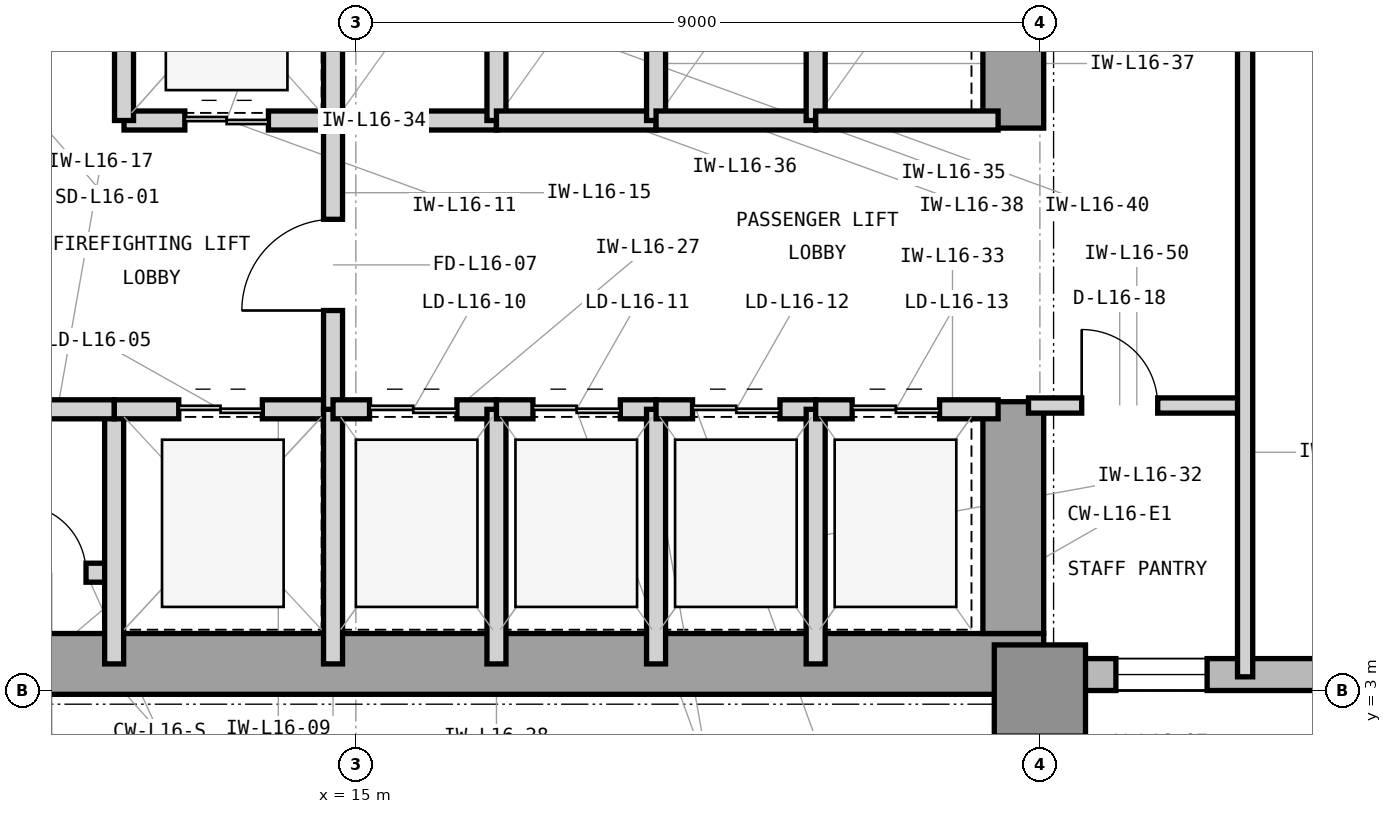
"""IFC4 building model, lengths in metres.
Left out: names, types, materials, properties, quantities, classifications, styles, units other than length and angle.
Written with IfcOpenShell. Run it as: python <this file> out.ifc"""

import sys

from ifc_helpers import new_model, si_unit, direction, frame, frame_2d, origin, origin_2d, place, context, subcontext, project, spatial, rectangle, extrude, element, fill, save


model = new_model("IFC4")
c1 = context("Model", 3, precision=1e-05, world=origin(), true_north=direction((0.0, 1.0)))
c2 = subcontext(c1, "Body", "Model", "MODEL_VIEW")
j1 = project(units=[si_unit("LENGTHUNIT", "METRE"), si_unit("PLANEANGLEUNIT", "RADIAN")], contexts=[c1])
p1 = place(None, origin())
s1 = spatial("IfcSite", under=j1, at=p1, CompositionType="ELEMENT")
p2 = place(p1, origin())
s2 = spatial("IfcBuilding", under=s1, at=p2, CompositionType="ELEMENT")
p3 = place(p2, frame((0.0, 0.0, 72.0)))
s3 = spatial("IfcBuildingStorey", under=s2, at=p3, CompositionType="ELEMENT", Elevation=72.0)
p4 = place(p3, frame((7.475, 3.35, 0.0), z_axis=(0.0, 0.0, 1.0), x_axis=(1.0, 0.0, 0.0)))
e1 = element("IfcWall", 1, at=p4, inside=s3, PredefinedType="SHEAR", context=c2, shape_type="SweptSolid", body=[
    extrude(rectangle(XDim=16.575, YDim=0.8, at=frame_2d((8.288, 0.0))), origin(), (0.0, 0.0, 1.0), 4.2),
])
p5 = place(p3, frame((23.65, 3.75, 0.0), z_axis=(0.0, 0.0, 1.0), x_axis=(0.0, 1.0, 0.0)))
e2 = element("IfcWall", 2, at=p5, inside=s3, PredefinedType="SHEAR", context=c2, shape_type="SweptSolid", body=[
    extrude(rectangle(XDim=3.05, YDim=0.8, at=frame_2d((1.525, 0.0))), origin(), (0.0, 0.0, 1.0), 4.2),
])
p6 = place(p3, frame((23.65, 10.4, 0.0), z_axis=(0.0, 0.0, 1.0), x_axis=(0.0, 1.0, 0.0)))
e3 = element("IfcWall", 3, at=p6, inside=s3, PredefinedType="SHEAR", context=c2, shape_type="SweptSolid", body=[
    extrude(rectangle(XDim=3.2, YDim=0.8, at=frame_2d((1.6, 0.0))), origin(), (0.0, 0.0, 1.0), 4.2),
])
p7 = place(p3, frame((24.0, 3.0, 0.0), z_axis=(0.0, 0.0, 1.0), x_axis=(1.0, 0.0, 0.0)))
e4 = element("IfcColumn", 4, at=p7, inside=s3, PredefinedType="COLUMN", context=c2, shape_type="SweptSolid", body=[
    extrude(rectangle(XDim=1.2, YDim=1.2, at=origin_2d()), origin(), (0.0, 0.0, 1.0), 4.2),
])
p8 = place(p3, frame((23.9, 3.21, 0.0), z_axis=(0.0, 0.0, 1.0), x_axis=(1.0, 0.0, 0.0)))
e5 = element("IfcWall", 5, at=p8, inside=s3, PredefinedType="STANDARD", context=c2, shape_type="SweptSolid", body=[
    extrude(rectangle(XDim=40.5, YDim=0.42, at=frame_2d((20.25, 0.0))), origin(), (0.0, 0.0, 1.0), 3.98),
])
p9 = place(p8, frame((1.1, 0.0, 0.85)))
e6 = element("IfcOpeningElement", 6, at=p9, cuts=e5, PredefinedType="OPENING", context=c2, shape_type="SweptSolid", body=[
    extrude(rectangle(XDim=1.2, YDim=2.45, at=frame_2d((0.6, 1.225))), frame((0.0, 0.22, 0.0), z_axis=(0.0, -1.0, 0.0), x_axis=(1.0, 0.0, 0.0)), (0.0, 0.0, 1.0), 0.44),
])
p10 = place(p8, frame((5.136, 0.0, 0.85)))
e7 = element("IfcOpeningElement", 7, at=p10, cuts=e5, PredefinedType="OPENING", context=c2, shape_type="SweptSolid", body=[
    extrude(rectangle(XDim=2.8, YDim=2.45, at=frame_2d((1.4, 1.225))), frame((0.0, 0.22, 0.0), z_axis=(0.0, -1.0, 0.0), x_axis=(1.0, 0.0, 0.0)), (0.0, 0.0, 1.0), 0.44),
])
p11 = place(p8, frame((12.636, 0.0, 0.85)))
e8 = element("IfcOpeningElement", 8, at=p11, cuts=e5, PredefinedType="OPENING", context=c2, shape_type="SweptSolid", body=[
    extrude(rectangle(XDim=2.8, YDim=2.45, at=frame_2d((1.4, 1.225))), frame((0.0, 0.22, 0.0), z_axis=(0.0, -1.0, 0.0), x_axis=(1.0, 0.0, 0.0)), (0.0, 0.0, 1.0), 0.44),
])
p12 = place(p8, frame((20.336, 0.0, 0.85)))
e9 = element("IfcOpeningElement", 9, at=p12, cuts=e5, PredefinedType="OPENING", context=c2, shape_type="SweptSolid", body=[
    extrude(rectangle(XDim=2.8, YDim=2.45, at=frame_2d((1.4, 1.225))), frame((0.0, 0.22, 0.0), z_axis=(0.0, -1.0, 0.0), x_axis=(1.0, 0.0, 0.0)), (0.0, 0.0, 1.0), 0.44),
])
p13 = place(p8, frame((30.886, 0.0, 0.85)))
e10 = element("IfcOpeningElement", 10, at=p13, cuts=e5, PredefinedType="OPENING", context=c2, shape_type="SweptSolid", body=[
    extrude(rectangle(XDim=1.2, YDim=2.45, at=frame_2d((0.6, 1.225))), frame((0.0, 0.22, 0.0), z_axis=(0.0, -1.0, 0.0), x_axis=(1.0, 0.0, 0.0)), (0.0, 0.0, 1.0), 0.44),
])
p14 = place(p3, frame((10.33, 4.55, 0.0), z_axis=(0.0, 0.0, 1.0), x_axis=(1.0, 0.0, 0.0)))
e11 = element("IfcWall", 11, at=p14, inside=s3, PredefinedType="PARTITIONING", context=c2, shape_type="SweptSolid", body=[
    extrude(rectangle(XDim=1.49, YDim=0.25, at=frame_2d((0.745, 0.0))), origin(), (0.0, 0.0, 1.0), 3.97),
])
p15 = place(p14, frame((0.22, 0.0, 0.0)))
e12 = element("IfcOpeningElement", 12, at=p15, cuts=e11, PredefinedType="OPENING", context=c2, shape_type="SweptSolid", body=[
    extrude(rectangle(XDim=0.9, YDim=2.1, at=frame_2d((0.45, 1.05))), frame((0.0, 0.135, 0.0), z_axis=(0.0, -1.0, 0.0), x_axis=(1.0, 0.0, 0.0)), (0.0, 0.0, 1.0), 0.27),
])
p16 = place(p3, frame((11.82, 3.35, 0.0), z_axis=(0.0, 0.0, 1.0), x_axis=(0.0, 1.0, 0.0)))
e13 = element("IfcWall", 13, at=p16, inside=s3, PredefinedType="PARTITIONING", context=c2, shape_type="SweptSolid", body=[
    extrude(rectangle(XDim=3.35, YDim=0.25, at=frame_2d((1.675, 0.0))), origin(), (0.0, 0.0, 1.0), 3.97),
])
p17 = place(p3, frame((11.82, 6.7, 0.0), z_axis=(0.0, 0.0, 1.0), x_axis=(1.0, 0.0, 0.0)))
e14 = element("IfcWall", 14, at=p17, inside=s3, PredefinedType="PARTITIONING", context=c2, shape_type="SweptSolid", body=[
    extrude(rectangle(XDim=2.88, YDim=0.25, at=frame_2d((1.44, 0.0))), origin(), (0.0, 0.0, 1.0), 3.426),
])
p18 = place(p17, frame((0.85, 0.0, 0.0)))
e15 = element("IfcOpeningElement", 15, at=p18, cuts=e14, PredefinedType="OPENING", context=c2, shape_type="SweptSolid", body=[
    extrude(rectangle(XDim=1.1, YDim=2.25, at=frame_2d((0.55, 1.125))), frame((0.0, 0.135, 0.0), z_axis=(0.0, -1.0, 0.0), x_axis=(1.0, 0.0, 0.0)), (0.0, 0.0, 1.0), 0.27),
])
p19 = place(p3, frame((14.7, 3.35, 0.0), z_axis=(0.0, 0.0, 1.0), x_axis=(0.0, 1.0, 0.0)))
e16 = element("IfcWall", 16, at=p19, inside=s3, PredefinedType="PARTITIONING", context=c2, shape_type="SweptSolid", body=[
    extrude(rectangle(XDim=3.35, YDim=0.25, at=frame_2d((1.675, 0.0))), origin(), (0.0, 0.0, 1.0), 3.97),
])
p20 = place(p3, frame((11.95, 10.5, 0.0), z_axis=(0.0, 0.0, 1.0), x_axis=(1.0, 0.0, 0.0)))
e17 = element("IfcWall", 17, at=p20, inside=s3, PredefinedType="PARTITIONING", context=c2, shape_type="SweptSolid", body=[
    extrude(rectangle(XDim=2.75, YDim=0.25, at=frame_2d((1.375, 0.0))), origin(), (0.0, 0.0, 1.0), 3.426),
])
p21 = place(p20, frame((0.8, 0.0, 0.0)))
e18 = element("IfcOpeningElement", 18, at=p21, cuts=e17, PredefinedType="OPENING", context=c2, shape_type="SweptSolid", body=[
    extrude(rectangle(XDim=1.1, YDim=2.25, at=frame_2d((0.55, 1.125))), frame((0.0, 0.135, 0.0), z_axis=(0.0, -1.0, 0.0), x_axis=(1.0, 0.0, 0.0)), (0.0, 0.0, 1.0), 0.27),
])
for number, where, z_axis, x_axis in (
    (19, (11.95, 10.5, 0.0), (0.0, 0.0, 1.0), (0.0, 1.0, 0.0)),
    (20, (14.7, 10.5, 0.0), (0.0, 0.0, 1.0), (0.0, 1.0, 0.0)),
):
    element("IfcWall", number, at=place(p3, frame(where, z_axis=z_axis, x_axis=x_axis)), inside=s3, PredefinedType="PARTITIONING", context=c2, shape_type="SweptSolid", body=[
        extrude(rectangle(XDim=3.0, YDim=0.25, at=frame_2d((1.5, 0.0))), origin(), (0.0, 0.0, 1.0), 3.97),
    ])
p22 = place(p3, frame((14.7, 6.7, 0.0), z_axis=(0.0, 0.0, 1.0), x_axis=(0.0, 1.0, 0.0)))
e21 = element("IfcWall", 21, at=p22, inside=s3, PredefinedType="PARTITIONING", context=c2, shape_type="SweptSolid", body=[
    extrude(rectangle(XDim=3.8, YDim=0.25, at=frame_2d((1.9, 0.0))), origin(), (0.0, 0.0, 1.0), 3.97),
])
p23 = place(p22, frame((1.3, 0.0, 0.0)))
e22 = element("IfcOpeningElement", 22, at=p23, cuts=e21, PredefinedType="OPENING", context=c2, shape_type="SweptSolid", body=[
    extrude(rectangle(XDim=1.2, YDim=2.2, at=frame_2d((0.6, 1.1))), frame((0.0, 0.135, 0.0), z_axis=(0.0, -1.0, 0.0), x_axis=(1.0, 0.0, 0.0)), (0.0, 0.0, 1.0), 0.27),
])
p24 = place(p3, frame((10.33, 6.7, 0.0), z_axis=(0.0, 0.0, 1.0), x_axis=(1.0, 0.0, 0.0)))
e23 = element("IfcWall", 23, at=p24, inside=s3, PredefinedType="PARTITIONING", context=c2, shape_type="SweptSolid", body=[
    extrude(rectangle(XDim=1.49, YDim=0.25, at=frame_2d((0.745, 0.0))), origin(), (0.0, 0.0, 1.0), 3.426),
])
p25 = place(p3, frame((14.7, 6.7, 0.0), z_axis=(0.0, 0.0, 1.0), x_axis=(1.0, 0.0, 0.0)))
e24 = element("IfcWall", 24, at=p25, inside=s3, PredefinedType="PARTITIONING", context=c2, shape_type="SweptSolid", body=[
    extrude(rectangle(XDim=2.15, YDim=0.25, at=frame_2d((1.075, 0.0))), origin(), (0.0, 0.0, 1.0), 3.426),
])
p26 = place(p25, frame((0.48, 0.0, 0.0)))
e25 = element("IfcOpeningElement", 25, at=p26, cuts=e24, PredefinedType="OPENING", context=c2, shape_type="SweptSolid", body=[
    extrude(rectangle(XDim=1.15, YDim=2.25, at=frame_2d((0.575, 1.125))), frame((0.0, 0.135, 0.0), z_axis=(0.0, -1.0, 0.0), x_axis=(1.0, 0.0, 0.0)), (0.0, 0.0, 1.0), 0.27),
])
p27 = place(p3, frame((16.85, 3.35, 0.0), z_axis=(0.0, 0.0, 1.0), x_axis=(0.0, 1.0, 0.0)))
e26 = element("IfcWall", 26, at=p27, inside=s3, PredefinedType="PARTITIONING", context=c2, shape_type="SweptSolid", body=[
    extrude(rectangle(XDim=3.35, YDim=0.25, at=frame_2d((1.675, 0.0))), origin(), (0.0, 0.0, 1.0), 3.97),
])
p28 = place(p3, frame((16.85, 6.7, 0.0), z_axis=(0.0, 0.0, 1.0), x_axis=(1.0, 0.0, 0.0)))
e27 = element("IfcWall", 27, at=p28, inside=s3, PredefinedType="PARTITIONING", context=c2, shape_type="SweptSolid", body=[
    extrude(rectangle(XDim=2.1, YDim=0.25, at=frame_2d((1.05, 0.0))), origin(), (0.0, 0.0, 1.0), 3.426),
])
p29 = place(p28, frame((0.48, 0.0, 0.0)))
e28 = element("IfcOpeningElement", 28, at=p29, cuts=e27, PredefinedType="OPENING", context=c2, shape_type="SweptSolid", body=[
    extrude(rectangle(XDim=1.15, YDim=2.25, at=frame_2d((0.575, 1.125))), frame((0.0, 0.135, 0.0), z_axis=(0.0, -1.0, 0.0), x_axis=(1.0, 0.0, 0.0)), (0.0, 0.0, 1.0), 0.27),
])
p30 = place(p3, frame((18.95, 3.35, 0.0), z_axis=(0.0, 0.0, 1.0), x_axis=(0.0, 1.0, 0.0)))
e29 = element("IfcWall", 29, at=p30, inside=s3, PredefinedType="PARTITIONING", context=c2, shape_type="SweptSolid", body=[
    extrude(rectangle(XDim=3.35, YDim=0.25, at=frame_2d((1.675, 0.0))), origin(), (0.0, 0.0, 1.0), 3.97),
])
p31 = place(p3, frame((18.95, 6.7, 0.0), z_axis=(0.0, 0.0, 1.0), x_axis=(1.0, 0.0, 0.0)))
e30 = element("IfcWall", 30, at=p31, inside=s3, PredefinedType="PARTITIONING", context=c2, shape_type="SweptSolid", body=[
    extrude(rectangle(XDim=2.1, YDim=0.25, at=frame_2d((1.05, 0.0))), origin(), (0.0, 0.0, 1.0), 3.426),
])
p32 = place(p31, frame((0.48, 0.0, 0.0)))
e31 = element("IfcOpeningElement", 31, at=p32, cuts=e30, PredefinedType="OPENING", context=c2, shape_type="SweptSolid", body=[
    extrude(rectangle(XDim=1.15, YDim=2.25, at=frame_2d((0.575, 1.125))), frame((0.0, 0.135, 0.0), z_axis=(0.0, -1.0, 0.0), x_axis=(1.0, 0.0, 0.0)), (0.0, 0.0, 1.0), 0.27),
])
p33 = place(p3, frame((21.05, 3.35, 0.0), z_axis=(0.0, 0.0, 1.0), x_axis=(0.0, 1.0, 0.0)))
e32 = element("IfcWall", 32, at=p33, inside=s3, PredefinedType="PARTITIONING", context=c2, shape_type="SweptSolid", body=[
    extrude(rectangle(XDim=3.35, YDim=0.25, at=frame_2d((1.675, 0.0))), origin(), (0.0, 0.0, 1.0), 3.97),
])
p34 = place(p3, frame((21.05, 6.7, 0.0), z_axis=(0.0, 0.0, 1.0), x_axis=(1.0, 0.0, 0.0)))
e33 = element("IfcWall", 33, at=p34, inside=s3, PredefinedType="PARTITIONING", context=c2, shape_type="SweptSolid", body=[
    extrude(rectangle(XDim=2.4, YDim=0.25, at=frame_2d((1.2, 0.0))), origin(), (0.0, 0.0, 1.0), 3.426),
])
p35 = place(p34, frame((0.48, 0.0, 0.0)))
e34 = element("IfcOpeningElement", 34, at=p35, cuts=e33, PredefinedType="OPENING", context=c2, shape_type="SweptSolid", body=[
    extrude(rectangle(XDim=1.15, YDim=2.25, at=frame_2d((0.575, 1.125))), frame((0.0, 0.135, 0.0), z_axis=(0.0, -1.0, 0.0), x_axis=(1.0, 0.0, 0.0)), (0.0, 0.0, 1.0), 0.27),
])
p36 = place(p3, frame((14.7, 10.5, 0.0), z_axis=(0.0, 0.0, 1.0), x_axis=(1.0, 0.0, 0.0)))
e35 = element("IfcWall", 35, at=p36, inside=s3, PredefinedType="PARTITIONING", context=c2, shape_type="SweptSolid", body=[
    extrude(rectangle(XDim=2.15, YDim=0.25, at=frame_2d((1.075, 0.0))), origin(), (0.0, 0.0, 1.0), 3.426),
])
p37 = place(p3, frame((16.85, 10.5, 0.0), z_axis=(0.0, 0.0, 1.0), x_axis=(0.0, 1.0, 0.0)))
e36 = element("IfcWall", 36, at=p37, inside=s3, PredefinedType="PARTITIONING", context=c2, shape_type="SweptSolid", body=[
    extrude(rectangle(XDim=3.0, YDim=0.25, at=frame_2d((1.5, 0.0))), origin(), (0.0, 0.0, 1.0), 3.97),
])
p38 = place(p3, frame((16.85, 10.5, 0.0), z_axis=(0.0, 0.0, 1.0), x_axis=(1.0, 0.0, 0.0)))
e37 = element("IfcWall", 37, at=p38, inside=s3, PredefinedType="PARTITIONING", context=c2, shape_type="SweptSolid", body=[
    extrude(rectangle(XDim=2.1, YDim=0.25, at=frame_2d((1.05, 0.0))), origin(), (0.0, 0.0, 1.0), 3.426),
])
p39 = place(p3, frame((18.95, 10.5, 0.0), z_axis=(0.0, 0.0, 1.0), x_axis=(0.0, 1.0, 0.0)))
e38 = element("IfcWall", 38, at=p39, inside=s3, PredefinedType="PARTITIONING", context=c2, shape_type="SweptSolid", body=[
    extrude(rectangle(XDim=3.0, YDim=0.25, at=frame_2d((1.5, 0.0))), origin(), (0.0, 0.0, 1.0), 3.97),
])
p40 = place(p3, frame((18.95, 10.5, 0.0), z_axis=(0.0, 0.0, 1.0), x_axis=(1.0, 0.0, 0.0)))
e39 = element("IfcWall", 39, at=p40, inside=s3, PredefinedType="PARTITIONING", context=c2, shape_type="SweptSolid", body=[
    extrude(rectangle(XDim=2.1, YDim=0.25, at=frame_2d((1.05, 0.0))), origin(), (0.0, 0.0, 1.0), 3.426),
])
p41 = place(p3, frame((21.05, 10.5, 0.0), z_axis=(0.0, 0.0, 1.0), x_axis=(0.0, 1.0, 0.0)))
e40 = element("IfcWall", 40, at=p41, inside=s3, PredefinedType="PARTITIONING", context=c2, shape_type="SweptSolid", body=[
    extrude(rectangle(XDim=3.0, YDim=0.25, at=frame_2d((1.5, 0.0))), origin(), (0.0, 0.0, 1.0), 3.97),
])
p42 = place(p3, frame((21.05, 10.5, 0.0), z_axis=(0.0, 0.0, 1.0), x_axis=(1.0, 0.0, 0.0)))
e41 = element("IfcWall", 41, at=p42, inside=s3, PredefinedType="PARTITIONING", context=c2, shape_type="SweptSolid", body=[
    extrude(rectangle(XDim=2.4, YDim=0.25, at=frame_2d((1.2, 0.0))), origin(), (0.0, 0.0, 1.0), 3.426),
])
p43 = place(p3, frame((23.85, 6.75, 0.0), z_axis=(0.0, 0.0, 1.0), x_axis=(1.0, 0.0, 0.0)))
e42 = element("IfcWall", 42, at=p43, inside=s3, PredefinedType="PARTITIONING", context=c2, shape_type="SweptSolid", body=[
    extrude(rectangle(XDim=2.85, YDim=0.2, at=frame_2d((1.425, 0.0))), origin(), (0.0, 0.0, 1.0), 3.97),
])
p44 = place(p43, frame((0.7, 0.0, 0.0)))
e43 = element("IfcOpeningElement", 43, at=p44, cuts=e42, PredefinedType="OPENING", context=c2, shape_type="SweptSolid", body=[
    extrude(rectangle(XDim=1.0, YDim=2.15, at=frame_2d((0.5, 1.075))), frame((0.0, 0.11, 0.0), z_axis=(0.0, -1.0, 0.0), x_axis=(1.0, 0.0, 0.0)), (0.0, 0.0, 1.0), 0.22),
])
p45 = place(p3, frame((26.7, 3.18, 0.0), z_axis=(0.0, 0.0, 1.0), x_axis=(0.0, 1.0, 0.0)))
e44 = element("IfcWall", 44, at=p45, inside=s3, PredefinedType="PARTITIONING", context=c2, shape_type="SweptSolid", body=[
    extrude(rectangle(XDim=11.82, YDim=0.2, at=frame_2d((5.91, 0.0))), origin(), (0.0, 0.0, 1.0), 3.97),
])
p46 = place(p15, origin())
e45 = element("IfcDoor", 45, at=p46, inside=s3, OperationType="SINGLE_SWING_LEFT", PredefinedType="TRAPDOOR", context=c2, shape_type="SweptSolid", body=[
    extrude(rectangle(XDim=0.9, YDim=2.1, at=frame_2d((0.45, 1.05))), frame((0.0, 0.025, 0.0), z_axis=(0.0, -1.0, 0.0), x_axis=(1.0, 0.0, 0.0)), (0.0, 0.0, 1.0), 0.05),
])
fill(e12, e45)
p47 = place(p18, origin())
e46 = element("IfcDoor", 46, at=p47, inside=s3, OperationType="DOUBLE_DOOR_SLIDING", PredefinedType="DOOR", context=c2, shape_type="SweptSolid", body=[
    extrude(rectangle(XDim=1.1, YDim=2.25, at=frame_2d((0.55, 1.125))), frame((0.0, 0.025, 0.0), z_axis=(0.0, -1.0, 0.0), x_axis=(1.0, 0.0, 0.0)), (0.0, 0.0, 1.0), 0.05),
])
fill(e15, e46)
p48 = place(p21, origin())
e47 = element("IfcDoor", 47, at=p48, inside=s3, OperationType="DOUBLE_DOOR_SLIDING", PredefinedType="DOOR", context=c2, shape_type="SweptSolid", body=[
    extrude(rectangle(XDim=1.1, YDim=2.25, at=frame_2d((0.55, 1.125))), frame((0.0, 0.025, 0.0), z_axis=(0.0, -1.0, 0.0), x_axis=(1.0, 0.0, 0.0)), (0.0, 0.0, 1.0), 0.05),
])
fill(e18, e47)
p49 = place(p23, origin())
e48 = element("IfcDoor", 48, at=p49, inside=s3, OperationType="SINGLE_SWING_LEFT", PredefinedType="DOOR", context=c2, shape_type="SweptSolid", body=[
    extrude(rectangle(XDim=1.2, YDim=2.2, at=frame_2d((0.6, 1.1))), frame((0.0, 0.025, 0.0), z_axis=(0.0, -1.0, 0.0), x_axis=(1.0, 0.0, 0.0)), (0.0, 0.0, 1.0), 0.05),
])
fill(e22, e48)
p50 = place(p26, origin())
e49 = element("IfcDoor", 49, at=p50, inside=s3, OperationType="DOUBLE_DOOR_SLIDING", PredefinedType="DOOR", context=c2, shape_type="SweptSolid", body=[
    extrude(rectangle(XDim=1.15, YDim=2.25, at=frame_2d((0.575, 1.125))), frame((0.0, 0.025, 0.0), z_axis=(0.0, -1.0, 0.0), x_axis=(1.0, 0.0, 0.0)), (0.0, 0.0, 1.0), 0.05),
])
fill(e25, e49)
p51 = place(p29, origin())
e50 = element("IfcDoor", 50, at=p51, inside=s3, OperationType="DOUBLE_DOOR_SLIDING", PredefinedType="DOOR", context=c2, shape_type="SweptSolid", body=[
    extrude(rectangle(XDim=1.15, YDim=2.25, at=frame_2d((0.575, 1.125))), frame((0.0, 0.025, 0.0), z_axis=(0.0, -1.0, 0.0), x_axis=(1.0, 0.0, 0.0)), (0.0, 0.0, 1.0), 0.05),
])
fill(e28, e50)
p52 = place(p32, origin())
e51 = element("IfcDoor", 51, at=p52, inside=s3, OperationType="DOUBLE_DOOR_SLIDING", PredefinedType="DOOR", context=c2, shape_type="SweptSolid", body=[
    extrude(rectangle(XDim=1.15, YDim=2.25, at=frame_2d((0.575, 1.125))), frame((0.0, 0.025, 0.0), z_axis=(0.0, -1.0, 0.0), x_axis=(1.0, 0.0, 0.0)), (0.0, 0.0, 1.0), 0.05),
])
fill(e31, e51)
p53 = place(p35, origin())
e52 = element("IfcDoor", 52, at=p53, inside=s3, OperationType="DOUBLE_DOOR_SLIDING", PredefinedType="DOOR", context=c2, shape_type="SweptSolid", body=[
    extrude(rectangle(XDim=1.15, YDim=2.25, at=frame_2d((0.575, 1.125))), frame((0.0, 0.025, 0.0), z_axis=(0.0, -1.0, 0.0), x_axis=(1.0, 0.0, 0.0)), (0.0, 0.0, 1.0), 0.05),
])
fill(e34, e52)
p54 = place(p44, origin())
e53 = element("IfcDoor", 53, at=p54, inside=s3, OperationType="SINGLE_SWING_LEFT", PredefinedType="DOOR", context=c2, shape_type="SweptSolid", body=[
    extrude(rectangle(XDim=1.0, YDim=2.15, at=frame_2d((0.5, 1.075))), frame((0.0, 0.025, 0.0), z_axis=(0.0, -1.0, 0.0), x_axis=(1.0, 0.0, 0.0)), (0.0, 0.0, 1.0), 0.05),
])
fill(e43, e53)
p55 = place(p9, origin())
e54 = element("IfcWindow", 54, at=p55, inside=s3, PartitioningType="SINGLE_PANEL", PredefinedType="WINDOW", context=c2, shape_type="SweptSolid", body=[
    extrude(rectangle(XDim=1.2, YDim=2.45, at=frame_2d((0.6, 1.225))), frame((0.0, 0.11, 0.0), z_axis=(0.0, -1.0, 0.0), x_axis=(1.0, 0.0, 0.0)), (0.0, 0.0, 1.0), 0.06),
])
fill(e6, e54)
save(model, sys.argv[1])
